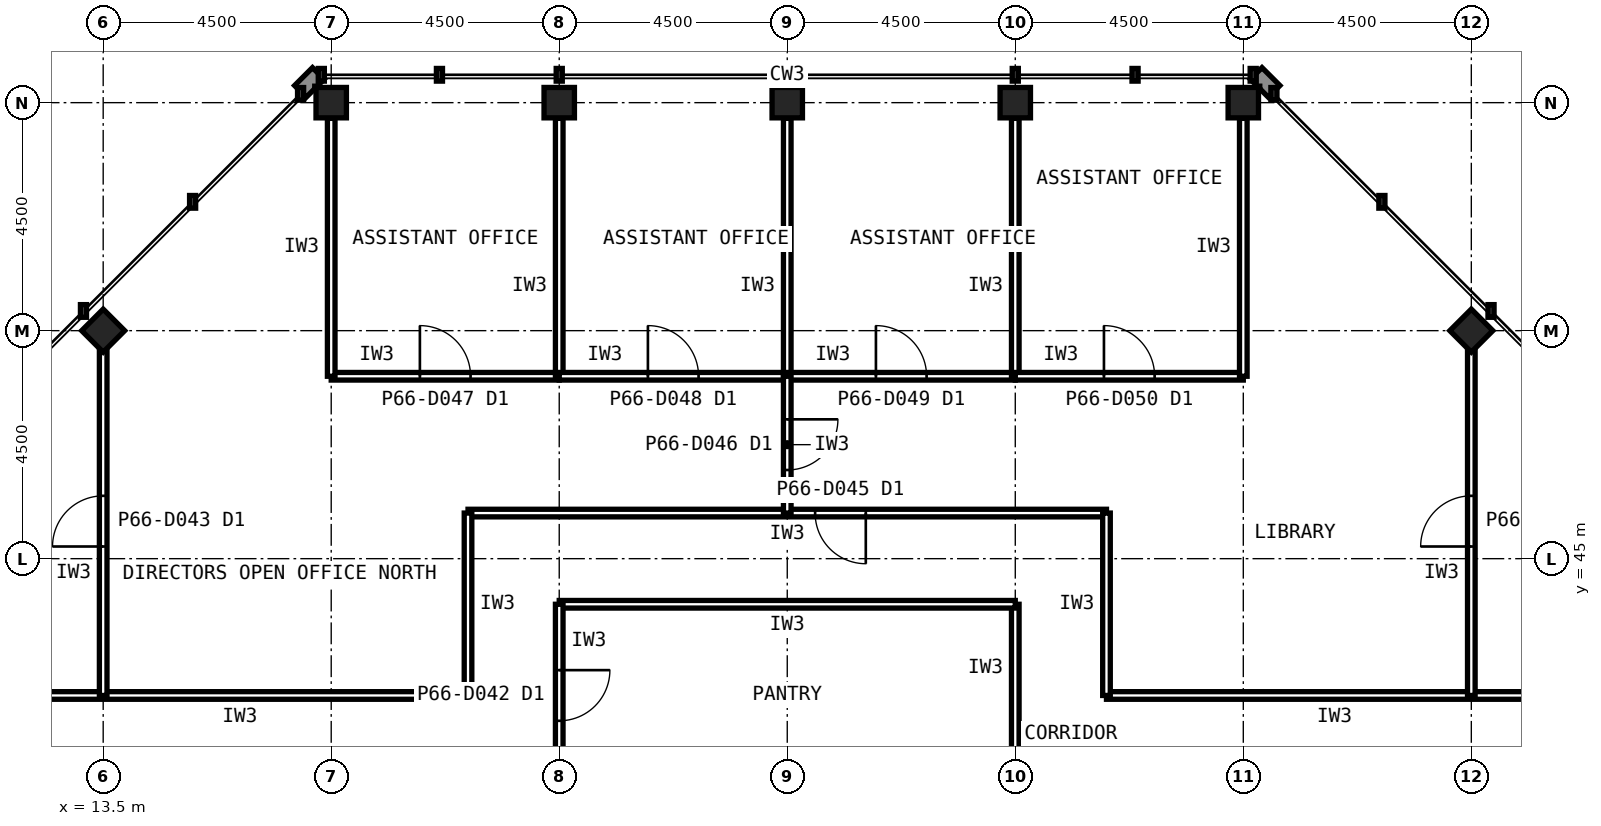
"""IFC4 building model, lengths in metres.
Left out: names, types, materials, properties, quantities, classifications, styles, units other than length and angle.
Written with IfcOpenShell. Run it as: python <this file> out.ifc"""

import sys

from ifc_helpers import new_model, si_unit, direction, frame, frame_2d, origin, origin_2d, place, context, subcontext, project, spatial, rectangle, hollow_rectangle, extrude, element, fill, save


model = new_model("IFC4")
c1 = context("Model", 3, precision=1e-05, world=origin(), true_north=direction((0.0, 1.0)))
c2 = subcontext(c1, "Body", "Model", "MODEL_VIEW")
j1 = project(units=[si_unit("LENGTHUNIT", "METRE"), si_unit("PLANEANGLEUNIT", "RADIAN")], contexts=[c1])
p1 = place(None, origin())
s1 = spatial("IfcSite", under=j1, at=p1, CompositionType="ELEMENT")
p2 = place(p1, origin())
s2 = spatial("IfcBuilding", under=s1, at=p2, CompositionType="ELEMENT")
p3 = place(p2, frame((0.0, 0.0, 278.6)))
s3 = spatial("IfcBuildingStorey", under=s2, at=p3, CompositionType="ELEMENT", Elevation=278.6)
for number, where, z_axis, x_axis in (
    (1, (36.0, 54.0, 0.0), (0.0, 0.0, 1.0), (1.0, 0.0, 0.0)),
    (2, (31.5, 54.0, 0.0), (0.0, 0.0, 1.0), (1.0, 0.0, 0.0)),
    (3, (27.0, 54.0, 0.0), (0.0, 0.0, 1.0), (1.0, 0.0, 0.0)),
    (4, (22.5, 54.0, 0.0), (0.0, 0.0, 1.0), (1.0, 0.0, 0.0)),
    (5, (18.0, 54.0, 0.0), (0.0, 0.0, 1.0), (1.0, 0.0, 0.0)),
    (6, (40.5, 49.5, 0.0), (0.0, 0.0, 1.0), (0.707, 0.707, 0.0)),
    (7, (13.5, 49.5, 0.0), (0.0, 0.0, 1.0), (0.707, 0.707, 0.0)),
):
    element("IfcColumn", number, at=place(p3, frame(where, z_axis=z_axis, x_axis=x_axis)), inside=s3, PredefinedType="COLUMN", context=c2, shape_type="SweptSolid", body=[
        extrude(hollow_rectangle(XDim=0.6, YDim=0.6, WallThickness=0.028, at=origin_2d()), origin(), (0.0, 0.0, 1.0), 4.0),
    ])
p4 = place(p3, frame((33.3, 45.9, 0.0), z_axis=(0.0, 0.0, 1.0), x_axis=(-1.0, 0.0, 0.0)))
e8 = element("IfcWall", 8, at=p4, inside=s3, PredefinedType="PARTITIONING", context=c2, shape_type="SweptSolid", body=[
    extrude(rectangle(XDim=12.6, YDim=0.15, at=frame_2d((6.3, 0.0))), origin(), (0.0, 0.0, 1.0), 3.84),
])
p5 = place(p4, frame((4.75, 0.0, 0.0)))
e9 = element("IfcOpeningElement", 9, at=p5, cuts=e8, PredefinedType="OPENING", context=c2, shape_type="SweptSolid", body=[
    extrude(rectangle(XDim=1.0, YDim=2.1, at=frame_2d((0.5, 1.05))), frame((0.0, 0.085, 0.0), z_axis=(0.0, -1.0, 0.0), x_axis=(1.0, 0.0, 0.0)), (0.0, 0.0, 1.0), 0.17),
])
for number, where, z_axis, x_axis in (
    (10, (20.7, 42.3, 0.0), (0.0, 0.0, 1.0), (-1.0, 0.0, 0.0)),
    (11, (42.3, 42.3, 0.0), (0.0, 0.0, 1.0), (-1.0, 0.0, 0.0)),
):
    element("IfcWall", number, at=place(p3, frame(where, z_axis=z_axis, x_axis=x_axis)), inside=s3, PredefinedType="PARTITIONING", context=c2, shape_type="SweptSolid", body=[
        extrude(rectangle(XDim=9.0, YDim=0.15, at=frame_2d((4.5, 0.0))), origin(), (0.0, 0.0, 1.0), 3.84),
    ])
for number, where, z_axis, x_axis in (
    (12, (20.7, 45.9, 0.0), (0.0, 0.0, 1.0), (0.0, -1.0, 0.0)),
    (13, (33.3, 42.3, 0.0), (0.0, 0.0, 1.0), (0.0, 1.0, 0.0)),
):
    element("IfcWall", number, at=place(p3, frame(where, z_axis=z_axis, x_axis=x_axis)), inside=s3, PredefinedType="PARTITIONING", context=c2, shape_type="SweptSolid", body=[
        extrude(rectangle(XDim=3.6, YDim=0.15, at=frame_2d((1.8, 0.0))), origin(), (0.0, 0.0, 1.0), 3.84),
    ])
p6 = place(p3, frame((31.5, 40.5, 0.0), z_axis=(0.0, 0.0, 1.0), x_axis=(0.0, 1.0, 0.0)))
e14 = element("IfcWall", 14, at=p6, inside=s3, PredefinedType="PARTITIONING", context=c2, shape_type="SweptSolid", body=[
    extrude(rectangle(XDim=3.6, YDim=0.15, at=frame_2d((1.8, 0.0))), origin(), (0.0, 0.0, 1.0), 2.989),
])
p7 = place(p3, frame((31.5, 44.1, 0.0), z_axis=(0.0, 0.0, 1.0), x_axis=(-1.0, 0.0, 0.0)))
e15 = element("IfcWall", 15, at=p7, inside=s3, PredefinedType="PARTITIONING", context=c2, shape_type="SweptSolid", body=[
    extrude(rectangle(XDim=9.0, YDim=0.15, at=frame_2d((4.5, 0.0))), origin(), (0.0, 0.0, 1.0), 3.84),
])
p8 = place(p3, frame((22.5, 44.1, 0.0), z_axis=(0.0, 0.0, 1.0), x_axis=(0.0, -1.0, 0.0)))
e16 = element("IfcWall", 16, at=p8, inside=s3, PredefinedType="PARTITIONING", context=c2, shape_type="SweptSolid", body=[
    extrude(rectangle(XDim=3.6, YDim=0.15, at=frame_2d((1.8, 0.0))), origin(), (0.0, 0.0, 1.0), 2.989),
])
p9 = place(p8, frame((1.3, 0.0, 0.0)))
e17 = element("IfcOpeningElement", 17, at=p9, cuts=e16, PredefinedType="OPENING", context=c2, shape_type="SweptSolid", body=[
    extrude(rectangle(XDim=1.0, YDim=2.1, at=frame_2d((0.5, 1.05))), frame((0.0, 0.085, 0.0), z_axis=(0.0, -1.0, 0.0), x_axis=(1.0, 0.0, 0.0)), (0.0, 0.0, 1.0), 0.17),
])
p10 = place(p3, frame((18.0, 48.6, 0.0), z_axis=(0.0, 0.0, 1.0), x_axis=(1.0, 0.0, 0.0)))
e18 = element("IfcWall", 18, at=p10, inside=s3, PredefinedType="PARTITIONING", context=c2, shape_type="SweptSolid", body=[
    extrude(rectangle(XDim=4.5, YDim=0.15, at=frame_2d((2.25, 0.0))), origin(), (0.0, 0.0, 1.0), 3.84),
])
p11 = place(p10, frame((1.75, 0.0, 0.0)))
e19 = element("IfcOpeningElement", 19, at=p11, cuts=e18, PredefinedType="OPENING", context=c2, shape_type="SweptSolid", body=[
    extrude(rectangle(XDim=1.0, YDim=2.1, at=frame_2d((0.5, 1.05))), frame((0.0, 0.085, 0.0), z_axis=(0.0, -1.0, 0.0), x_axis=(1.0, 0.0, 0.0)), (0.0, 0.0, 1.0), 0.17),
])
for number, where, z_axis, x_axis in (
    (20, (22.5, 48.6, 0.0), (0.0, 0.0, 1.0), (0.0, 1.0, 0.0)),
    (21, (18.0, 53.69, 0.0), (0.0, 0.0, 1.0), (0.0, -1.0, 0.0)),
):
    element("IfcWall", number, at=place(p3, frame(where, z_axis=z_axis, x_axis=x_axis)), inside=s3, PredefinedType="PARTITIONING", context=c2, shape_type="SweptSolid", body=[
        extrude(rectangle(XDim=5.09, YDim=0.15, at=frame_2d((2.545, 0.0))), origin(), (0.0, 0.0, 1.0), 2.989),
    ])
p12 = place(p3, frame((22.5, 48.6, 0.0), z_axis=(0.0, 0.0, 1.0), x_axis=(1.0, 0.0, 0.0)))
e22 = element("IfcWall", 22, at=p12, inside=s3, PredefinedType="PARTITIONING", context=c2, shape_type="SweptSolid", body=[
    extrude(rectangle(XDim=4.5, YDim=0.15, at=frame_2d((2.25, 0.0))), origin(), (0.0, 0.0, 1.0), 3.84),
])
p13 = place(p12, frame((1.75, 0.0, 0.0)))
e23 = element("IfcOpeningElement", 23, at=p13, cuts=e22, PredefinedType="OPENING", context=c2, shape_type="SweptSolid", body=[
    extrude(rectangle(XDim=1.0, YDim=2.1, at=frame_2d((0.5, 1.05))), frame((0.0, 0.085, 0.0), z_axis=(0.0, -1.0, 0.0), x_axis=(1.0, 0.0, 0.0)), (0.0, 0.0, 1.0), 0.17),
])
p14 = place(p3, frame((27.0, 48.6, 0.0), z_axis=(0.0, 0.0, 1.0), x_axis=(0.0, 1.0, 0.0)))
e24 = element("IfcWall", 24, at=p14, inside=s3, PredefinedType="PARTITIONING", context=c2, shape_type="SweptSolid", body=[
    extrude(rectangle(XDim=5.09, YDim=0.15, at=frame_2d((2.545, 0.0))), origin(), (0.0, 0.0, 1.0), 2.989),
])
p15 = place(p3, frame((27.0, 48.6, 0.0), z_axis=(0.0, 0.0, 1.0), x_axis=(1.0, 0.0, 0.0)))
e25 = element("IfcWall", 25, at=p15, inside=s3, PredefinedType="PARTITIONING", context=c2, shape_type="SweptSolid", body=[
    extrude(rectangle(XDim=4.5, YDim=0.15, at=frame_2d((2.25, 0.0))), origin(), (0.0, 0.0, 1.0), 3.84),
])
p16 = place(p15, frame((1.75, 0.0, 0.0)))
e26 = element("IfcOpeningElement", 26, at=p16, cuts=e25, PredefinedType="OPENING", context=c2, shape_type="SweptSolid", body=[
    extrude(rectangle(XDim=1.0, YDim=2.1, at=frame_2d((0.5, 1.05))), frame((0.0, 0.085, 0.0), z_axis=(0.0, -1.0, 0.0), x_axis=(1.0, 0.0, 0.0)), (0.0, 0.0, 1.0), 0.17),
])
p17 = place(p3, frame((31.5, 48.6, 0.0), z_axis=(0.0, 0.0, 1.0), x_axis=(0.0, 1.0, 0.0)))
e27 = element("IfcWall", 27, at=p17, inside=s3, PredefinedType="PARTITIONING", context=c2, shape_type="SweptSolid", body=[
    extrude(rectangle(XDim=5.09, YDim=0.15, at=frame_2d((2.545, 0.0))), origin(), (0.0, 0.0, 1.0), 2.989),
])
p18 = place(p3, frame((31.5, 48.6, 0.0), z_axis=(0.0, 0.0, 1.0), x_axis=(1.0, 0.0, 0.0)))
e28 = element("IfcWall", 28, at=p18, inside=s3, PredefinedType="PARTITIONING", context=c2, shape_type="SweptSolid", body=[
    extrude(rectangle(XDim=4.5, YDim=0.15, at=frame_2d((2.25, 0.0))), origin(), (0.0, 0.0, 1.0), 3.84),
])
p19 = place(p18, frame((1.75, 0.0, 0.0)))
e29 = element("IfcOpeningElement", 29, at=p19, cuts=e28, PredefinedType="OPENING", context=c2, shape_type="SweptSolid", body=[
    extrude(rectangle(XDim=1.0, YDim=2.1, at=frame_2d((0.5, 1.05))), frame((0.0, 0.085, 0.0), z_axis=(0.0, -1.0, 0.0), x_axis=(1.0, 0.0, 0.0)), (0.0, 0.0, 1.0), 0.17),
])
p20 = place(p3, frame((36.0, 48.6, 0.0), z_axis=(0.0, 0.0, 1.0), x_axis=(0.0, 1.0, 0.0)))
e30 = element("IfcWall", 30, at=p20, inside=s3, PredefinedType="PARTITIONING", context=c2, shape_type="SweptSolid", body=[
    extrude(rectangle(XDim=5.09, YDim=0.15, at=frame_2d((2.545, 0.0))), origin(), (0.0, 0.0, 1.0), 2.989),
])
p21 = place(p3, frame((13.5, 42.3, 0.0), z_axis=(0.0, 0.0, 1.0), x_axis=(0.0, 1.0, 0.0)))
e31 = element("IfcWall", 31, at=p21, inside=s3, PredefinedType="PARTITIONING", context=c2, shape_type="SweptSolid", body=[
    extrude(rectangle(XDim=6.88, YDim=0.15, at=frame_2d((3.44, 0.0))), origin(), (0.0, 0.0, 1.0), 2.989),
])
p22 = place(p21, frame((2.94, 0.0, 0.0)))
e32 = element("IfcOpeningElement", 32, at=p22, cuts=e31, PredefinedType="OPENING", context=c2, shape_type="SweptSolid", body=[
    extrude(rectangle(XDim=1.0, YDim=2.1, at=frame_2d((0.5, 1.05))), frame((0.0, 0.085, 0.0), z_axis=(0.0, -1.0, 0.0), x_axis=(1.0, 0.0, 0.0)), (0.0, 0.0, 1.0), 0.17),
])
p23 = place(p3, frame((27.0, 48.6, 0.0), z_axis=(0.0, 0.0, 1.0), x_axis=(0.0, -1.0, 0.0)))
e33 = element("IfcWall", 33, at=p23, inside=s3, PredefinedType="PARTITIONING", context=c2, shape_type="SweptSolid", body=[
    extrude(rectangle(XDim=2.7, YDim=0.15, at=frame_2d((1.35, 0.0))), origin(), (0.0, 0.0, 1.0), 2.989),
])
p24 = place(p23, frame((0.85, 0.0, 0.0)))
e34 = element("IfcOpeningElement", 34, at=p24, cuts=e33, PredefinedType="OPENING", context=c2, shape_type="SweptSolid", body=[
    extrude(rectangle(XDim=1.0, YDim=2.1, at=frame_2d((0.5, 1.05))), frame((0.0, 0.085, 0.0), z_axis=(0.0, -1.0, 0.0), x_axis=(1.0, 0.0, 0.0)), (0.0, 0.0, 1.0), 0.17),
])
p25 = place(p3, frame((40.5, 42.3, 0.0), z_axis=(0.0, 0.0, 1.0), x_axis=(0.0, 1.0, 0.0)))
e35 = element("IfcWall", 35, at=p25, inside=s3, PredefinedType="PARTITIONING", context=c2, shape_type="SweptSolid", body=[
    extrude(rectangle(XDim=6.88, YDim=0.15, at=frame_2d((3.44, 0.0))), origin(), (0.0, 0.0, 1.0), 2.989),
])
p26 = place(p25, frame((2.94, 0.0, 0.0)))
e36 = element("IfcOpeningElement", 36, at=p26, cuts=e35, PredefinedType="OPENING", context=c2, shape_type="SweptSolid", body=[
    extrude(rectangle(XDim=1.0, YDim=2.1, at=frame_2d((0.5, 1.05))), frame((0.0, 0.085, 0.0), z_axis=(0.0, -1.0, 0.0), x_axis=(1.0, 0.0, 0.0)), (0.0, 0.0, 1.0), 0.17),
])
p27 = place(p5, origin())
e37 = element("IfcDoor", 37, at=p27, inside=s3, OperationType="SINGLE_SWING_LEFT", PredefinedType="DOOR", context=c2, shape_type="SweptSolid", body=[
    extrude(rectangle(XDim=1.0, YDim=2.1, at=frame_2d((0.5, 1.05))), frame((0.0, 0.025, 0.0), z_axis=(0.0, -1.0, 0.0), x_axis=(1.0, 0.0, 0.0)), (0.0, 0.0, 1.0), 0.05),
])
fill(e9, e37)
p28 = place(p9, origin())
e38 = element("IfcDoor", 38, at=p28, inside=s3, OperationType="SINGLE_SWING_LEFT", PredefinedType="DOOR", context=c2, shape_type="SweptSolid", body=[
    extrude(rectangle(XDim=1.0, YDim=2.1, at=frame_2d((0.5, 1.05))), frame((0.0, 0.025, 0.0), z_axis=(0.0, -1.0, 0.0), x_axis=(1.0, 0.0, 0.0)), (0.0, 0.0, 1.0), 0.05),
])
fill(e17, e38)
p29 = place(p11, origin())
e39 = element("IfcDoor", 39, at=p29, inside=s3, OperationType="SINGLE_SWING_LEFT", PredefinedType="DOOR", context=c2, shape_type="SweptSolid", body=[
    extrude(rectangle(XDim=1.0, YDim=2.1, at=frame_2d((0.5, 1.05))), frame((0.0, 0.025, 0.0), z_axis=(0.0, -1.0, 0.0), x_axis=(1.0, 0.0, 0.0)), (0.0, 0.0, 1.0), 0.05),
])
fill(e19, e39)
p30 = place(p13, origin())
e40 = element("IfcDoor", 40, at=p30, inside=s3, OperationType="SINGLE_SWING_LEFT", PredefinedType="DOOR", context=c2, shape_type="SweptSolid", body=[
    extrude(rectangle(XDim=1.0, YDim=2.1, at=frame_2d((0.5, 1.05))), frame((0.0, 0.025, 0.0), z_axis=(0.0, -1.0, 0.0), x_axis=(1.0, 0.0, 0.0)), (0.0, 0.0, 1.0), 0.05),
])
fill(e23, e40)
p31 = place(p16, origin())
e41 = element("IfcDoor", 41, at=p31, inside=s3, OperationType="SINGLE_SWING_LEFT", PredefinedType="DOOR", context=c2, shape_type="SweptSolid", body=[
    extrude(rectangle(XDim=1.0, YDim=2.1, at=frame_2d((0.5, 1.05))), frame((0.0, 0.025, 0.0), z_axis=(0.0, -1.0, 0.0), x_axis=(1.0, 0.0, 0.0)), (0.0, 0.0, 1.0), 0.05),
])
fill(e26, e41)
p32 = place(p19, origin())
e42 = element("IfcDoor", 42, at=p32, inside=s3, OperationType="SINGLE_SWING_LEFT", PredefinedType="DOOR", context=c2, shape_type="SweptSolid", body=[
    extrude(rectangle(XDim=1.0, YDim=2.1, at=frame_2d((0.5, 1.05))), frame((0.0, 0.025, 0.0), z_axis=(0.0, -1.0, 0.0), x_axis=(1.0, 0.0, 0.0)), (0.0, 0.0, 1.0), 0.05),
])
fill(e29, e42)
p33 = place(p22, origin())
e43 = element("IfcDoor", 43, at=p33, inside=s3, OperationType="SINGLE_SWING_LEFT", PredefinedType="DOOR", context=c2, shape_type="SweptSolid", body=[
    extrude(rectangle(XDim=1.0, YDim=2.1, at=frame_2d((0.5, 1.05))), frame((0.0, 0.025, 0.0), z_axis=(0.0, -1.0, 0.0), x_axis=(1.0, 0.0, 0.0)), (0.0, 0.0, 1.0), 0.05),
])
fill(e32, e43)
p34 = place(p24, origin())
e44 = element("IfcDoor", 44, at=p34, inside=s3, OperationType="SINGLE_SWING_LEFT", PredefinedType="DOOR", context=c2, shape_type="SweptSolid", body=[
    extrude(rectangle(XDim=1.0, YDim=2.1, at=frame_2d((0.5, 1.05))), frame((0.0, 0.025, 0.0), z_axis=(0.0, -1.0, 0.0), x_axis=(1.0, 0.0, 0.0)), (0.0, 0.0, 1.0), 0.05),
])
fill(e34, e44)
p35 = place(p26, origin())
e45 = element("IfcDoor", 45, at=p35, inside=s3, OperationType="SINGLE_SWING_LEFT", PredefinedType="DOOR", context=c2, shape_type="SweptSolid", body=[
    extrude(rectangle(XDim=1.0, YDim=2.1, at=frame_2d((0.5, 1.05))), frame((0.0, 0.025, 0.0), z_axis=(0.0, -1.0, 0.0), x_axis=(1.0, 0.0, 0.0)), (0.0, 0.0, 1.0), 0.05),
])
fill(e36, e45)
save(model, sys.argv[1])
